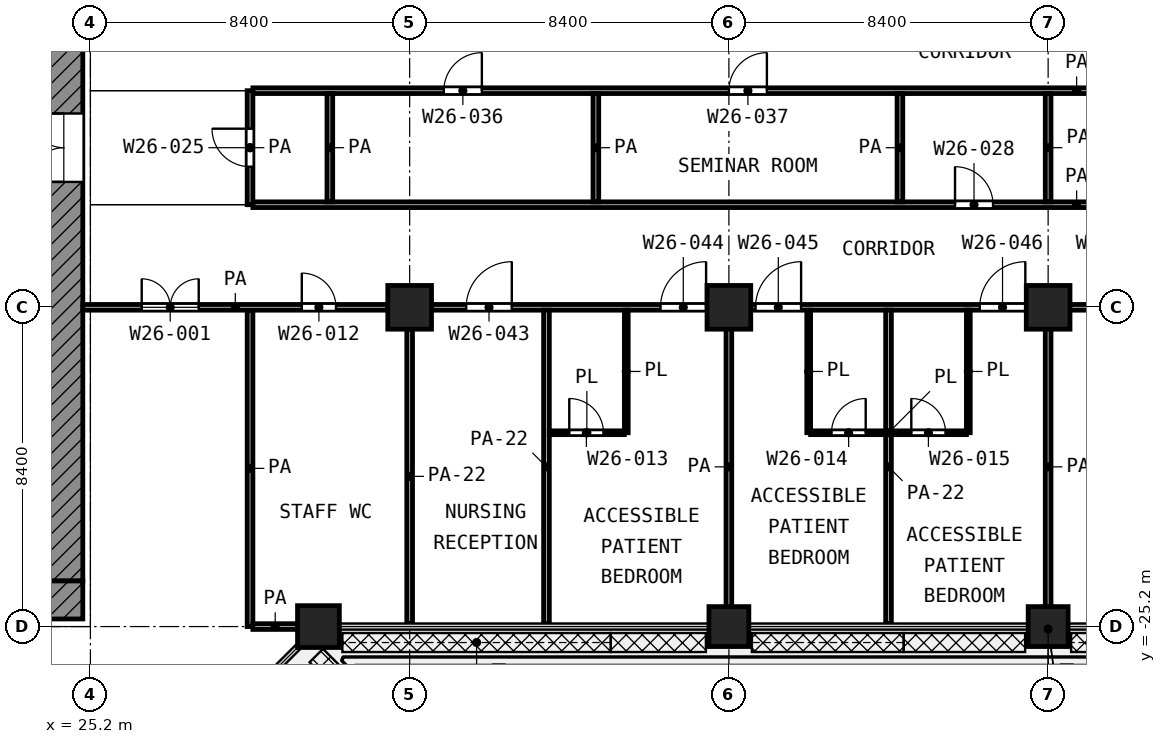
"""IFC4 building model, lengths in metres.
Left out: names, types, materials, properties, quantities, classifications, styles, units other than length and angle.
Written with IfcOpenShell. Run it as: python <this file> out.ifc"""

import sys

from ifc_helpers import new_model, si_unit, direction, frame, frame_2d, origin, origin_2d, place, context, subcontext, project, spatial, rectangle, extrude, element, fill, save


model = new_model("IFC4")
c1 = context("Model", 3, precision=1e-05, world=origin(), true_north=direction((0.0, 1.0)))
c2 = subcontext(c1, "Body", "Model", "MODEL_VIEW")
j1 = project(units=[si_unit("LENGTHUNIT", "METRE"), si_unit("PLANEANGLEUNIT", "RADIAN")], contexts=[c1])
p1 = place(None, origin())
s1 = spatial("IfcSite", under=j1, at=p1, CompositionType="ELEMENT")
p2 = place(p1, origin())
s2 = spatial("IfcBuilding", under=s1, at=p2, CompositionType="ELEMENT")
p3 = place(p2, frame((0.0, 0.0, 136.6)))
s3 = spatial("IfcBuildingStorey", under=s2, at=p3, CompositionType="ELEMENT", Elevation=136.6)
for number, where, z_axis, x_axis in (
    (1, (33.6, -16.8, 0.0), (0.0, 0.0, 1.0), (1.0, 0.0, 0.0)),
    (2, (42.0, -16.8, 0.0), (0.0, 0.0, 1.0), (1.0, 0.0, 0.0)),
    (3, (50.4, -16.8, 0.0), (0.0, 0.0, 1.0), (1.0, 0.0, 0.0)),
):
    element("IfcColumn", number, at=place(p3, frame(where, z_axis=z_axis, x_axis=x_axis)), inside=s3, PredefinedType="COLUMN", context=c2, shape_type="SweptSolid", body=[
        extrude(rectangle(XDim=1.15, YDim=1.15, at=origin_2d()), origin(), (0.0, 0.0, 1.0), 4.2),
    ])
p4 = place(p3, frame((31.2, -25.2, 0.0), z_axis=(0.0, 0.0, 1.0), x_axis=(1.0, 0.0, 0.0)))
e4 = element("IfcColumn", 4, at=p4, inside=s3, PredefinedType="COLUMN", context=c2, shape_type="SweptSolid", body=[
    extrude(rectangle(XDim=1.1, YDim=1.1, at=origin_2d()), origin(), (0.0, 0.0, 1.0), 4.2),
])
for number, where, z_axis, x_axis in (
    (5, (42.0, -25.2, 0.0), (0.0, 0.0, 1.0), (1.0, 0.0, 0.0)),
    (6, (50.4, -25.2, 0.0), (0.0, 0.0, 1.0), (1.0, 0.0, 0.0)),
):
    element("IfcColumn", number, at=place(p3, frame(where, z_axis=z_axis, x_axis=x_axis)), inside=s3, PredefinedType="COLUMN", context=c2, shape_type="SweptSolid", body=[
        extrude(rectangle(XDim=1.05, YDim=1.05, at=origin_2d()), origin(), (0.0, 0.0, 1.0), 4.2),
    ])
p5 = place(p3, frame((24.5, -24.0, 0.0), z_axis=(0.0, 0.0, 1.0), x_axis=(0.0, 1.0, 0.0)))
e7 = element("IfcWall", 7, at=p5, inside=s3, PredefinedType="SHEAR", context=c2, shape_type="SweptSolid", body=[
    extrude(rectangle(XDim=18.6, YDim=1.0, at=frame_2d((9.3, 0.0))), origin(), (0.0, 0.0, 1.0), 3.6),
])
p6 = place(p5, frame((10.5, 0.0, 0.0)))
e8 = element("IfcOpeningElement", 8, at=p6, cuts=e7, PredefinedType="OPENING", context=c2, shape_type="SweptSolid", body=[
    extrude(rectangle(XDim=1.8, YDim=2.1, at=frame_2d((0.9, 1.05))), frame((0.0, 0.51, 0.0), z_axis=(0.0, -1.0, 0.0), x_axis=(1.0, 0.0, 0.0)), (0.0, 0.0, 1.0), 1.02),
])
p7 = place(p3, frame((24.5, -25.0, 0.0), z_axis=(0.0, 0.0, 1.0), x_axis=(0.0, 1.0, 0.0)))
e9 = element("IfcWall", 9, at=p7, inside=s3, PredefinedType="SHEAR", context=c2, shape_type="SweptSolid", body=[
    extrude(rectangle(XDim=1.0, YDim=1.0, at=frame_2d((0.5, 0.0))), origin(), (0.0, 0.0, 1.0), 3.6),
])
p8 = place(p3, frame((37.275, -20.1, 0.0), z_axis=(0.0, 0.0, 1.0), x_axis=(1.0, 0.0, 0.0)))
e10 = element("IfcWall", 10, at=p8, inside=s3, PredefinedType="PARTITIONING", context=c2, shape_type="SweptSolid", body=[
    extrude(rectangle(XDim=1.975, YDim=0.1, at=frame_2d((0.988, 0.0))), origin(), (0.0, 0.0, 1.0), 3.6),
])
p9 = place(p8, frame((0.525, 0.0, 0.0)))
e11 = element("IfcOpeningElement", 11, at=p9, cuts=e10, PredefinedType="OPENING", context=c2, shape_type="SweptSolid", body=[
    extrude(rectangle(XDim=0.9, YDim=2.1, at=frame_2d((0.45, 1.05))), frame((0.0, 0.06, 0.0), z_axis=(0.0, -1.0, 0.0), x_axis=(1.0, 0.0, 0.0)), (0.0, 0.0, 1.0), 0.12),
])
p10 = place(p3, frame((44.15, -20.1, 0.0), z_axis=(0.0, 0.0, 1.0), x_axis=(1.0, 0.0, 0.0)))
e12 = element("IfcWall", 12, at=p10, inside=s3, PredefinedType="PARTITIONING", context=c2, shape_type="SweptSolid", body=[
    extrude(rectangle(XDim=4.1, YDim=0.1, at=frame_2d((2.05, 0.0))), origin(), (0.0, 0.0, 1.0), 3.6),
])
p11 = place(p10, frame((0.55, 0.0, 0.0)))
e13 = element("IfcOpeningElement", 13, at=p11, cuts=e12, PredefinedType="OPENING", context=c2, shape_type="SweptSolid", body=[
    extrude(rectangle(XDim=0.9, YDim=2.1, at=frame_2d((0.45, 1.05))), frame((0.0, 0.06, 0.0), z_axis=(0.0, -1.0, 0.0), x_axis=(1.0, 0.0, 0.0)), (0.0, 0.0, 1.0), 0.12),
])
p12 = place(p10, frame((2.65, 0.0, 0.0)))
e14 = element("IfcOpeningElement", 14, at=p12, cuts=e12, PredefinedType="OPENING", context=c2, shape_type="SweptSolid", body=[
    extrude(rectangle(XDim=0.9, YDim=2.1, at=frame_2d((0.45, 1.05))), frame((0.0, 0.06, 0.0), z_axis=(0.0, -1.0, 0.0), x_axis=(1.0, 0.0, 0.0)), (0.0, 0.0, 1.0), 0.12),
])
for number, where, z_axis, x_axis in (
    (15, (39.3, -20.1, 0.0), (0.0, 0.0, 1.0), (0.0, 1.0, 0.0)),
    (16, (44.1, -20.1, 0.0), (0.0, 0.0, 1.0), (0.0, 1.0, 0.0)),
    (17, (48.3, -20.1, 0.0), (0.0, 0.0, 1.0), (0.0, 1.0, 0.0)),
):
    element("IfcWall", number, at=place(p3, frame(where, z_axis=z_axis, x_axis=x_axis)), inside=s3, PredefinedType="PARTITIONING", context=c2, shape_type="SweptSolid", body=[
        extrude(rectangle(XDim=3.225, YDim=0.1, at=frame_2d((1.613, 0.0))), origin(), (0.0, 0.0, 1.0), 3.6),
    ])
p13 = place(p3, frame((29.475, -25.2, 0.0), z_axis=(0.0, 0.0, 1.0), x_axis=(1.0, 0.0, 0.0)))
e18 = element("IfcWall", 18, at=p13, inside=s3, PredefinedType="PARTITIONING", context=c2, shape_type="SweptSolid", body=[
    extrude(rectangle(XDim=1.175, YDim=0.15, at=frame_2d((0.587, 0.0))), origin(), (0.0, 0.0, 1.0), 3.6),
])
p14 = place(p3, frame((25.0, -16.8, 0.0), z_axis=(0.0, 0.0, 1.0), x_axis=(1.0, 0.0, 0.0)))
e19 = element("IfcWall", 19, at=p14, inside=s3, PredefinedType="PARTITIONING", context=c2, shape_type="SweptSolid", body=[
    extrude(rectangle(XDim=8.025, YDim=0.15, at=frame_2d((4.012, 0.0))), origin(), (0.0, 0.0, 1.0), 3.6),
])
p15 = place(p14, frame((1.55, 0.0, 0.0)))
e20 = element("IfcOpeningElement", 20, at=p15, cuts=e19, PredefinedType="OPENING", context=c2, shape_type="SweptSolid", body=[
    extrude(rectangle(XDim=1.5, YDim=2.1, at=frame_2d((0.75, 1.05))), frame((0.0, 0.085, 0.0), z_axis=(0.0, -1.0, 0.0), x_axis=(1.0, 0.0, 0.0)), (0.0, 0.0, 1.0), 0.17),
])
p16 = place(p14, frame((5.762, 0.0, 0.0)))
e21 = element("IfcOpeningElement", 21, at=p16, cuts=e19, PredefinedType="OPENING", context=c2, shape_type="SweptSolid", body=[
    extrude(rectangle(XDim=0.9, YDim=2.1, at=frame_2d((0.45, 1.05))), frame((0.0, 0.085, 0.0), z_axis=(0.0, -1.0, 0.0), x_axis=(1.0, 0.0, 0.0)), (0.0, 0.0, 1.0), 0.17),
])
p17 = place(p3, frame((34.175, -16.8, 0.0), z_axis=(0.0, 0.0, 1.0), x_axis=(1.0, 0.0, 0.0)))
e22 = element("IfcWall", 22, at=p17, inside=s3, PredefinedType="PARTITIONING", context=c2, shape_type="SweptSolid", body=[
    extrude(rectangle(XDim=41.345, YDim=0.15, at=frame_2d((20.672, 0.0))), origin(), (0.0, 0.0, 1.0), 3.6),
])
p18 = place(p17, frame((0.913, 0.0, 0.0)))
e23 = element("IfcOpeningElement", 23, at=p18, cuts=e22, PredefinedType="OPENING", context=c2, shape_type="SweptSolid", body=[
    extrude(rectangle(XDim=1.2, YDim=2.1, at=frame_2d((0.6, 1.05))), frame((0.0, 0.085, 0.0), z_axis=(0.0, -1.0, 0.0), x_axis=(1.0, 0.0, 0.0)), (0.0, 0.0, 1.0), 0.17),
])
p19 = place(p17, frame((6.025, 0.0, 0.0)))
e24 = element("IfcOpeningElement", 24, at=p19, cuts=e22, PredefinedType="OPENING", context=c2, shape_type="SweptSolid", body=[
    extrude(rectangle(XDim=1.2, YDim=2.1, at=frame_2d((0.6, 1.05))), frame((0.0, 0.085, 0.0), z_axis=(0.0, -1.0, 0.0), x_axis=(1.0, 0.0, 0.0)), (0.0, 0.0, 1.0), 0.17),
])
p20 = place(p17, frame((8.525, 0.0, 0.0)))
e25 = element("IfcOpeningElement", 25, at=p20, cuts=e22, PredefinedType="OPENING", context=c2, shape_type="SweptSolid", body=[
    extrude(rectangle(XDim=1.2, YDim=2.1, at=frame_2d((0.6, 1.05))), frame((0.0, 0.085, 0.0), z_axis=(0.0, -1.0, 0.0), x_axis=(1.0, 0.0, 0.0)), (0.0, 0.0, 1.0), 0.17),
])
p21 = place(p17, frame((14.425, 0.0, 0.0)))
e26 = element("IfcOpeningElement", 26, at=p21, cuts=e22, PredefinedType="OPENING", context=c2, shape_type="SweptSolid", body=[
    extrude(rectangle(XDim=1.2, YDim=2.1, at=frame_2d((0.6, 1.05))), frame((0.0, 0.085, 0.0), z_axis=(0.0, -1.0, 0.0), x_axis=(1.0, 0.0, 0.0)), (0.0, 0.0, 1.0), 0.17),
])
p22 = place(p17, frame((17.425, 0.0, 0.0)))
e27 = element("IfcOpeningElement", 27, at=p22, cuts=e22, PredefinedType="OPENING", context=c2, shape_type="SweptSolid", body=[
    extrude(rectangle(XDim=1.2, YDim=2.1, at=frame_2d((0.6, 1.05))), frame((0.0, 0.085, 0.0), z_axis=(0.0, -1.0, 0.0), x_axis=(1.0, 0.0, 0.0)), (0.0, 0.0, 1.0), 0.17),
])
p23 = place(p17, frame((22.825, 0.0, 0.0)))
e28 = element("IfcOpeningElement", 28, at=p23, cuts=e22, PredefinedType="OPENING", context=c2, shape_type="SweptSolid", body=[
    extrude(rectangle(XDim=1.2, YDim=2.1, at=frame_2d((0.6, 1.05))), frame((0.0, 0.085, 0.0), z_axis=(0.0, -1.0, 0.0), x_axis=(1.0, 0.0, 0.0)), (0.0, 0.0, 1.0), 0.17),
])
p24 = place(p17, frame((21.225, 0.0, 0.0)))
e29 = element("IfcOpeningElement", 29, at=p24, cuts=e22, PredefinedType="OPENING", context=c2, shape_type="SweptSolid", body=[
    extrude(rectangle(XDim=1.2, YDim=2.1, at=frame_2d((0.6, 1.05))), frame((0.0, 0.085, 0.0), z_axis=(0.0, -1.0, 0.0), x_axis=(1.0, 0.0, 0.0)), (0.0, 0.0, 1.0), 0.17),
])
p25 = place(p17, frame((31.225, 0.0, 0.0)))
e30 = element("IfcOpeningElement", 30, at=p25, cuts=e22, PredefinedType="OPENING", context=c2, shape_type="SweptSolid", body=[
    extrude(rectangle(XDim=1.2, YDim=2.1, at=frame_2d((0.6, 1.05))), frame((0.0, 0.085, 0.0), z_axis=(0.0, -1.0, 0.0), x_axis=(1.0, 0.0, 0.0)), (0.0, 0.0, 1.0), 0.17),
])
p26 = place(p17, frame((34.025, 0.0, 0.0)))
e31 = element("IfcOpeningElement", 31, at=p26, cuts=e22, PredefinedType="OPENING", context=c2, shape_type="SweptSolid", body=[
    extrude(rectangle(XDim=1.2, YDim=2.1, at=frame_2d((0.6, 1.05))), frame((0.0, 0.085, 0.0), z_axis=(0.0, -1.0, 0.0), x_axis=(1.0, 0.0, 0.0)), (0.0, 0.0, 1.0), 0.17),
])
p27 = place(p17, frame((38.975, 0.0, 0.0)))
e32 = element("IfcOpeningElement", 32, at=p27, cuts=e22, PredefinedType="OPENING", context=c2, shape_type="SweptSolid", body=[
    extrude(rectangle(XDim=1.0, YDim=2.1, at=frame_2d((0.5, 1.05))), frame((0.0, 0.085, 0.0), z_axis=(0.0, -1.0, 0.0), x_axis=(1.0, 0.0, 0.0)), (0.0, 0.0, 1.0), 0.17),
])
p28 = place(p3, frame((29.475, -14.1, 0.0), z_axis=(0.0, 0.0, 1.0), x_axis=(1.0, 0.0, 0.0)))
e33 = element("IfcWall", 33, at=p28, inside=s3, PredefinedType="PARTITIONING", context=c2, shape_type="SweptSolid", body=[
    extrude(rectangle(XDim=43.35, YDim=0.15, at=frame_2d((21.675, 0.0))), origin(), (0.0, 0.0, 1.0), 3.6),
])
p29 = place(p28, frame((18.475, 0.0, 0.0)))
e34 = element("IfcOpeningElement", 34, at=p29, cuts=e33, PredefinedType="OPENING", context=c2, shape_type="SweptSolid", body=[
    extrude(rectangle(XDim=1.0, YDim=2.1, at=frame_2d((0.5, 1.05))), frame((0.0, 0.085, 0.0), z_axis=(0.0, -1.0, 0.0), x_axis=(1.0, 0.0, 0.0)), (0.0, 0.0, 1.0), 0.17),
])
p30 = place(p3, frame((29.475, -11.1, 0.0), z_axis=(0.0, 0.0, 1.0), x_axis=(1.0, 0.0, 0.0)))
e35 = element("IfcWall", 35, at=p30, inside=s3, PredefinedType="PARTITIONING", context=c2, shape_type="SweptSolid", body=[
    extrude(rectangle(XDim=43.35, YDim=0.15, at=frame_2d((21.675, 0.0))), origin(), (0.0, 0.0, 1.0), 3.6),
])
p31 = place(p30, frame((28.825, 0.0, 0.0)))
e36 = element("IfcOpeningElement", 36, at=p31, cuts=e35, PredefinedType="OPENING", context=c2, shape_type="SweptSolid", body=[
    extrude(rectangle(XDim=1.0, YDim=2.1, at=frame_2d((0.5, 1.05))), frame((0.0, 0.085, 0.0), z_axis=(0.0, -1.0, 0.0), x_axis=(1.0, 0.0, 0.0)), (0.0, 0.0, 1.0), 0.17),
])
p32 = place(p30, frame((40.125, 0.0, 0.0)))
e37 = element("IfcOpeningElement", 37, at=p32, cuts=e35, PredefinedType="OPENING", context=c2, shape_type="SweptSolid", body=[
    extrude(rectangle(XDim=0.9, YDim=2.1, at=frame_2d((0.45, 1.05))), frame((0.0, 0.085, 0.0), z_axis=(0.0, -1.0, 0.0), x_axis=(1.0, 0.0, 0.0)), (0.0, 0.0, 1.0), 0.17),
])
p33 = place(p30, frame((5.025, 0.0, 0.0)))
e38 = element("IfcOpeningElement", 38, at=p33, cuts=e35, PredefinedType="OPENING", context=c2, shape_type="SweptSolid", body=[
    extrude(rectangle(XDim=1.0, YDim=2.1, at=frame_2d((0.5, 1.05))), frame((0.0, 0.085, 0.0), z_axis=(0.0, -1.0, 0.0), x_axis=(1.0, 0.0, 0.0)), (0.0, 0.0, 1.0), 0.17),
])
p34 = place(p30, frame((12.525, 0.0, 0.0)))
e39 = element("IfcOpeningElement", 39, at=p34, cuts=e35, PredefinedType="OPENING", context=c2, shape_type="SweptSolid", body=[
    extrude(rectangle(XDim=1.0, YDim=2.1, at=frame_2d((0.5, 1.05))), frame((0.0, 0.085, 0.0), z_axis=(0.0, -1.0, 0.0), x_axis=(1.0, 0.0, 0.0)), (0.0, 0.0, 1.0), 0.17),
])
p35 = place(p3, frame((29.4, -25.2, 0.0), z_axis=(0.0, 0.0, 1.0), x_axis=(0.0, 1.0, 0.0)))
e40 = element("IfcWall", 40, at=p35, inside=s3, PredefinedType="PARTITIONING", context=c2, shape_type="SweptSolid", body=[
    extrude(rectangle(XDim=8.325, YDim=0.15, at=frame_2d((4.163, 0.0))), origin(), (0.0, 0.0, 1.0), 3.6),
])
p36 = place(p3, frame((29.4, -14.1, 0.0), z_axis=(0.0, 0.0, 1.0), x_axis=(0.0, 1.0, 0.0)))
e41 = element("IfcWall", 41, at=p36, inside=s3, PredefinedType="PARTITIONING", context=c2, shape_type="SweptSolid", body=[
    extrude(rectangle(XDim=3.0, YDim=0.15, at=frame_2d((1.5, 0.0))), origin(), (0.0, 0.0, 1.0), 3.6),
])
p37 = place(p36, frame((1.0, 0.0, 0.0)))
e42 = element("IfcOpeningElement", 42, at=p37, cuts=e41, PredefinedType="OPENING", context=c2, shape_type="SweptSolid", body=[
    extrude(rectangle(XDim=1.0, YDim=2.1, at=frame_2d((0.5, 1.05))), frame((0.0, 0.085, 0.0), z_axis=(0.0, -1.0, 0.0), x_axis=(1.0, 0.0, 0.0)), (0.0, 0.0, 1.0), 0.17),
])
p38 = place(p3, frame((31.5, -14.025, 0.0), z_axis=(0.0, 0.0, 1.0), x_axis=(0.0, 1.0, 0.0)))
e43 = element("IfcWall", 43, at=p38, inside=s3, PredefinedType="PARTITIONING", context=c2, shape_type="SweptSolid", body=[
    extrude(rectangle(XDim=2.85, YDim=0.15, at=frame_2d((1.425, 0.0))), origin(), (0.0, 0.0, 1.0), 3.6),
])
p39 = place(p3, frame((33.6, -25.12, 0.0), z_axis=(0.0, 0.0, 1.0), x_axis=(0.0, 1.0, 0.0)))
e44 = element("IfcWall", 44, at=p39, inside=s3, PredefinedType="PARTITIONING", context=c2, shape_type="SweptSolid", body=[
    extrude(rectangle(XDim=7.745, YDim=0.15, at=frame_2d((3.873, 0.0))), origin(), (0.0, 0.0, 1.0), 2.7),
])
p40 = place(p3, frame((37.2, -25.12, 0.0), z_axis=(0.0, 0.0, 1.0), x_axis=(0.0, 1.0, 0.0)))
e45 = element("IfcWall", 45, at=p40, inside=s3, PredefinedType="PARTITIONING", context=c2, shape_type="SweptSolid", body=[
    extrude(rectangle(XDim=8.245, YDim=0.15, at=frame_2d((4.123, 0.0))), origin(), (0.0, 0.0, 1.0), 2.7),
])
p41 = place(p3, frame((38.5, -14.025, 0.0), z_axis=(0.0, 0.0, 1.0), x_axis=(0.0, 1.0, 0.0)))
e46 = element("IfcWall", 46, at=p41, inside=s3, PredefinedType="PARTITIONING", context=c2, shape_type="SweptSolid", body=[
    extrude(rectangle(XDim=2.85, YDim=0.15, at=frame_2d((1.425, 0.0))), origin(), (0.0, 0.0, 1.0), 3.6),
])
p42 = place(p3, frame((42.0, -25.12, 0.0), z_axis=(0.0, 0.0, 1.0), x_axis=(0.0, 1.0, 0.0)))
e47 = element("IfcWall", 47, at=p42, inside=s3, PredefinedType="PARTITIONING", context=c2, shape_type="SweptSolid", body=[
    extrude(rectangle(XDim=8.245, YDim=0.15, at=frame_2d((4.123, 0.0))), origin(), (0.0, 0.0, 1.0), 3.6),
])
p43 = place(p3, frame((46.2, -25.12, 0.0), z_axis=(0.0, 0.0, 1.0), x_axis=(0.0, 1.0, 0.0)))
e48 = element("IfcWall", 48, at=p43, inside=s3, PredefinedType="PARTITIONING", context=c2, shape_type="SweptSolid", body=[
    extrude(rectangle(XDim=8.245, YDim=0.15, at=frame_2d((4.123, 0.0))), origin(), (0.0, 0.0, 1.0), 2.7),
])
p44 = place(p3, frame((46.5, -14.025, 0.0), z_axis=(0.0, 0.0, 1.0), x_axis=(0.0, 1.0, 0.0)))
e49 = element("IfcWall", 49, at=p44, inside=s3, PredefinedType="PARTITIONING", context=c2, shape_type="SweptSolid", body=[
    extrude(rectangle(XDim=2.85, YDim=0.15, at=frame_2d((1.425, 0.0))), origin(), (0.0, 0.0, 1.0), 3.6),
])
p45 = place(p3, frame((50.4, -25.12, 0.0), z_axis=(0.0, 0.0, 1.0), x_axis=(0.0, 1.0, 0.0)))
e50 = element("IfcWall", 50, at=p45, inside=s3, PredefinedType="PARTITIONING", context=c2, shape_type="SweptSolid", body=[
    extrude(rectangle(XDim=8.245, YDim=0.15, at=frame_2d((4.123, 0.0))), origin(), (0.0, 0.0, 1.0), 3.6),
])
p46 = place(p3, frame((50.4, -14.025, 0.0), z_axis=(0.0, 0.0, 1.0), x_axis=(0.0, 1.0, 0.0)))
e51 = element("IfcWall", 51, at=p46, inside=s3, PredefinedType="PARTITIONING", context=c2, shape_type="SweptSolid", body=[
    extrude(rectangle(XDim=2.85, YDim=0.15, at=frame_2d((1.425, 0.0))), origin(), (0.0, 0.0, 1.0), 3.6),
])
p47 = place(p6, origin())
e52 = element("IfcDoor", 52, at=p47, inside=s3, OperationType="DOUBLE_DOOR_SINGLE_SWING", PredefinedType="DOOR", context=c2, shape_type="SweptSolid", body=[
    extrude(rectangle(XDim=1.8, YDim=2.1, at=frame_2d((0.9, 1.05))), frame((0.0, 0.025, 0.0), z_axis=(0.0, -1.0, 0.0), x_axis=(1.0, 0.0, 0.0)), (0.0, 0.0, 1.0), 0.05),
])
fill(e8, e52)
p48 = place(p15, origin())
e53 = element("IfcDoor", 53, at=p48, inside=s3, OperationType="DOUBLE_DOOR_SINGLE_SWING", PredefinedType="DOOR", context=c2, shape_type="SweptSolid", body=[
    extrude(rectangle(XDim=1.5, YDim=2.1, at=frame_2d((0.75, 1.05))), frame((0.0, 0.025, 0.0), z_axis=(0.0, -1.0, 0.0), x_axis=(1.0, 0.0, 0.0)), (0.0, 0.0, 1.0), 0.05),
])
fill(e20, e53)
p49 = place(p29, origin())
e54 = element("IfcDoor", 54, at=p49, inside=s3, OperationType="SINGLE_SWING_LEFT", PredefinedType="DOOR", context=c2, shape_type="SweptSolid", body=[
    extrude(rectangle(XDim=1.0, YDim=2.1, at=frame_2d((0.5, 1.05))), frame((0.0, 0.025, 0.0), z_axis=(0.0, -1.0, 0.0), x_axis=(1.0, 0.0, 0.0)), (0.0, 0.0, 1.0), 0.05),
])
fill(e34, e54)
p50 = place(p16, origin())
e55 = element("IfcDoor", 55, at=p50, inside=s3, OperationType="SINGLE_SWING_LEFT", PredefinedType="DOOR", context=c2, shape_type="SweptSolid", body=[
    extrude(rectangle(XDim=0.9, YDim=2.1, at=frame_2d((0.45, 1.05))), frame((0.0, 0.025, 0.0), z_axis=(0.0, -1.0, 0.0), x_axis=(1.0, 0.0, 0.0)), (0.0, 0.0, 1.0), 0.05),
])
fill(e21, e55)
p51 = place(p18, origin())
e56 = element("IfcDoor", 56, at=p51, inside=s3, OperationType="SINGLE_SWING_RIGHT", PredefinedType="DOOR", context=c2, shape_type="SweptSolid", body=[
    extrude(rectangle(XDim=1.2, YDim=2.1, at=frame_2d((0.6, 1.05))), frame((0.0, 0.025, 0.0), z_axis=(0.0, -1.0, 0.0), x_axis=(1.0, 0.0, 0.0)), (0.0, 0.0, 1.0), 0.05),
])
fill(e23, e56)
p52 = place(p19, origin())
e57 = element("IfcDoor", 57, at=p52, inside=s3, OperationType="SINGLE_SWING_RIGHT", PredefinedType="DOOR", context=c2, shape_type="SweptSolid", body=[
    extrude(rectangle(XDim=1.2, YDim=2.1, at=frame_2d((0.6, 1.05))), frame((0.0, 0.025, 0.0), z_axis=(0.0, -1.0, 0.0), x_axis=(1.0, 0.0, 0.0)), (0.0, 0.0, 1.0), 0.05),
])
fill(e24, e57)
p53 = place(p9, origin())
e58 = element("IfcDoor", 58, at=p53, inside=s3, OperationType="SINGLE_SWING_LEFT", PredefinedType="DOOR", context=c2, shape_type="SweptSolid", body=[
    extrude(rectangle(XDim=0.9, YDim=2.1, at=frame_2d((0.45, 1.05))), frame((0.0, 0.025, 0.0), z_axis=(0.0, -1.0, 0.0), x_axis=(1.0, 0.0, 0.0)), (0.0, 0.0, 1.0), 0.05),
])
fill(e11, e58)
p54 = place(p20, origin())
e59 = element("IfcDoor", 59, at=p54, inside=s3, OperationType="SINGLE_SWING_RIGHT", PredefinedType="DOOR", context=c2, shape_type="SweptSolid", body=[
    extrude(rectangle(XDim=1.2, YDim=2.1, at=frame_2d((0.6, 1.05))), frame((0.0, 0.025, 0.0), z_axis=(0.0, -1.0, 0.0), x_axis=(1.0, 0.0, 0.0)), (0.0, 0.0, 1.0), 0.05),
])
fill(e25, e59)
p55 = place(p11, origin())
e60 = element("IfcDoor", 60, at=p55, inside=s3, OperationType="SINGLE_SWING_RIGHT", PredefinedType="DOOR", context=c2, shape_type="SweptSolid", body=[
    extrude(rectangle(XDim=0.9, YDim=2.1, at=frame_2d((0.45, 1.05))), frame((0.0, 0.025, 0.0), z_axis=(0.0, -1.0, 0.0), x_axis=(1.0, 0.0, 0.0)), (0.0, 0.0, 1.0), 0.05),
])
fill(e13, e60)
p56 = place(p21, origin())
e61 = element("IfcDoor", 61, at=p56, inside=s3, OperationType="SINGLE_SWING_RIGHT", PredefinedType="DOOR", context=c2, shape_type="SweptSolid", body=[
    extrude(rectangle(XDim=1.2, YDim=2.1, at=frame_2d((0.6, 1.05))), frame((0.0, 0.025, 0.0), z_axis=(0.0, -1.0, 0.0), x_axis=(1.0, 0.0, 0.0)), (0.0, 0.0, 1.0), 0.05),
])
fill(e26, e61)
p57 = place(p12, origin())
e62 = element("IfcDoor", 62, at=p57, inside=s3, OperationType="SINGLE_SWING_LEFT", PredefinedType="DOOR", context=c2, shape_type="SweptSolid", body=[
    extrude(rectangle(XDim=0.9, YDim=2.1, at=frame_2d((0.45, 1.05))), frame((0.0, 0.025, 0.0), z_axis=(0.0, -1.0, 0.0), x_axis=(1.0, 0.0, 0.0)), (0.0, 0.0, 1.0), 0.05),
])
fill(e14, e62)
p58 = place(p37, origin())
e63 = element("IfcDoor", 63, at=p58, inside=s3, OperationType="SINGLE_SWING_RIGHT", PredefinedType="DOOR", context=c2, shape_type="SweptSolid", body=[
    extrude(rectangle(XDim=1.0, YDim=2.1, at=frame_2d((0.5, 1.05))), frame((0.0, 0.025, 0.0), z_axis=(0.0, -1.0, 0.0), x_axis=(1.0, 0.0, 0.0)), (0.0, 0.0, 1.0), 0.05),
])
fill(e42, e63)
p59 = place(p33, origin())
e64 = element("IfcDoor", 64, at=p59, inside=s3, OperationType="SINGLE_SWING_RIGHT", PredefinedType="DOOR", context=c2, shape_type="SweptSolid", body=[
    extrude(rectangle(XDim=1.0, YDim=2.1, at=frame_2d((0.5, 1.05))), frame((0.0, 0.025, 0.0), z_axis=(0.0, -1.0, 0.0), x_axis=(1.0, 0.0, 0.0)), (0.0, 0.0, 1.0), 0.05),
])
fill(e38, e64)
p60 = place(p34, origin())
e65 = element("IfcDoor", 65, at=p60, inside=s3, OperationType="SINGLE_SWING_RIGHT", PredefinedType="DOOR", context=c2, shape_type="SweptSolid", body=[
    extrude(rectangle(XDim=1.0, YDim=2.1, at=frame_2d((0.5, 1.05))), frame((0.0, 0.025, 0.0), z_axis=(0.0, -1.0, 0.0), x_axis=(1.0, 0.0, 0.0)), (0.0, 0.0, 1.0), 0.05),
])
fill(e39, e65)
save(model, sys.argv[1])
